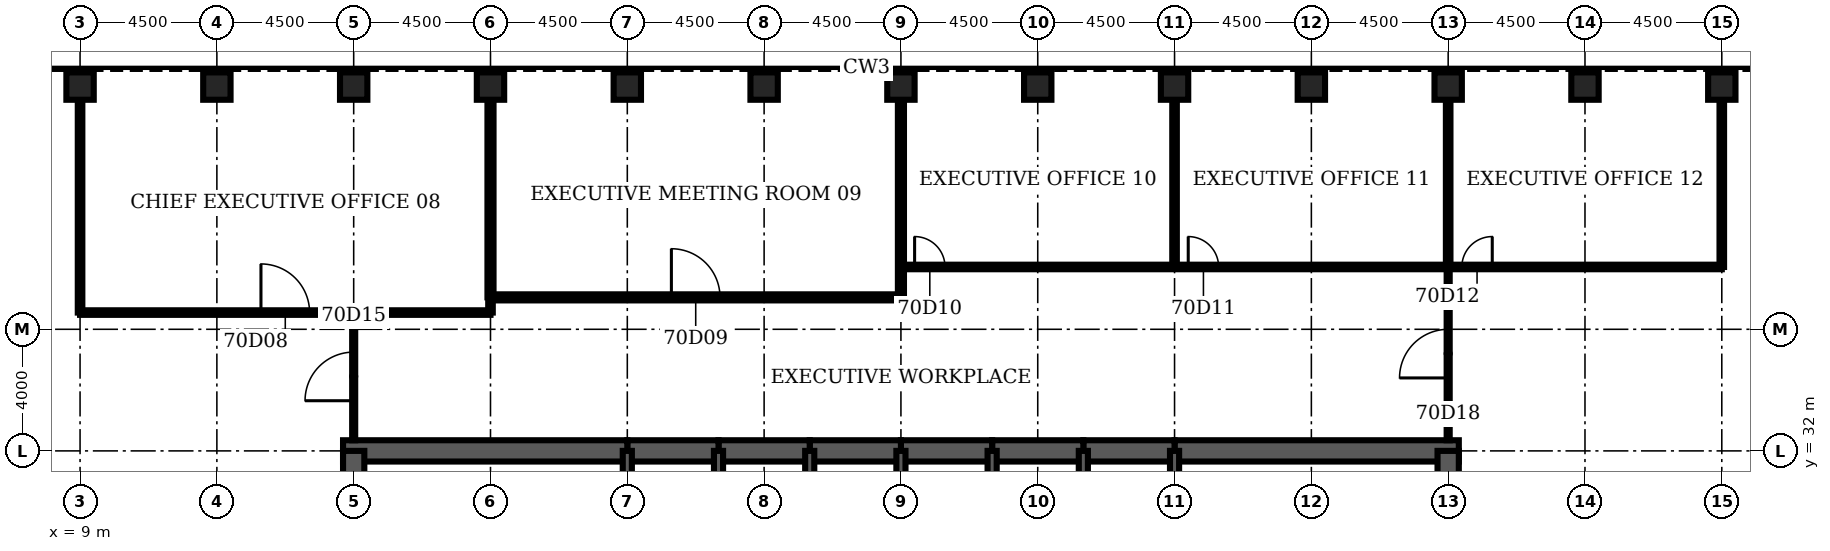
"""IFC4 building model, lengths in metres.
Left out: names, types, materials, properties, quantities, classifications, styles, units other than length and angle.
Written with IfcOpenShell. Run it as: python <this file> out.ifc"""

import sys

from ifc_helpers import new_model, si_unit, direction, frame, frame_2d, origin, origin_2d, place, context, subcontext, project, spatial, rectangle, hollow_rectangle, extrude, element, fill, save


model = new_model("IFC4")
c1 = context("Model", 3, precision=1e-05, world=origin(), true_north=direction((0.0, 1.0)))
c2 = subcontext(c1, "Body", "Model", "MODEL_VIEW")
j1 = project(units=[si_unit("LENGTHUNIT", "METRE"), si_unit("PLANEANGLEUNIT", "RADIAN")], contexts=[c1])
p1 = place(None, origin())
s1 = spatial("IfcSite", under=j1, at=p1, CompositionType="ELEMENT")
p2 = place(p1, origin())
s2 = spatial("IfcBuilding", under=s1, at=p2, CompositionType="ELEMENT")
p3 = place(p2, frame((0.0, 0.0, 308.9)))
s3 = spatial("IfcBuildingStorey", under=s2, at=p3, CompositionType="ELEMENT", Elevation=308.9)
for number, where, z_axis, x_axis in (
    (1, (63.0, 44.0, 0.0), (0.0, 0.0, 1.0), (0.0, 1.0, 0.0)),
    (2, (58.5, 44.0, 0.0), (0.0, 0.0, 1.0), (0.0, 1.0, 0.0)),
    (3, (54.0, 44.0, 0.0), (0.0, 0.0, 1.0), (0.0, 1.0, 0.0)),
    (4, (49.5, 44.0, 0.0), (0.0, 0.0, 1.0), (0.0, 1.0, 0.0)),
    (5, (45.0, 44.0, 0.0), (0.0, 0.0, 1.0), (0.0, 1.0, 0.0)),
    (6, (40.5, 44.0, 0.0), (0.0, 0.0, 1.0), (0.0, 1.0, 0.0)),
    (7, (36.0, 44.0, 0.0), (0.0, 0.0, 1.0), (0.0, 1.0, 0.0)),
    (8, (31.5, 44.0, 0.0), (0.0, 0.0, 1.0), (0.0, 1.0, 0.0)),
    (9, (27.0, 44.0, 0.0), (0.0, 0.0, 1.0), (0.0, 1.0, 0.0)),
    (10, (22.5, 44.0, 0.0), (0.0, 0.0, 1.0), (0.0, 1.0, 0.0)),
    (11, (18.0, 44.0, 0.0), (0.0, 0.0, 1.0), (0.0, 1.0, 0.0)),
    (12, (13.5, 44.0, 0.0), (0.0, 0.0, 1.0), (0.0, 1.0, 0.0)),
    (13, (9.0, 44.0, 0.0), (0.0, 0.0, 1.0), (0.0, 1.0, 0.0)),
):
    element("IfcColumn", number, at=place(p3, frame(where, z_axis=z_axis, x_axis=x_axis)), inside=s3, PredefinedType="COLUMN", context=c2, shape_type="SweptSolid", body=[
        extrude(hollow_rectangle(XDim=0.9, YDim=0.9, WallThickness=0.06, at=origin_2d()), origin(), (0.0, 0.0, 1.0), 4.2),
    ])
p4 = place(p3, frame((54.35, 32.0, 0.0), z_axis=(0.0, 0.0, 1.0), x_axis=(-1.0, 0.0, 0.0)))
e14 = element("IfcWall", 14, at=p4, inside=s3, PredefinedType="SHEAR", context=c2, shape_type="SweptSolid", body=[
    extrude(rectangle(XDim=9.35, YDim=0.7, at=frame_2d((4.675, 0.0))), origin(), (0.0, 0.0, 1.0), 4.2),
])
for number, where, z_axis, x_axis in (
    (15, (45.0, 32.0, 0.0), (0.0, 0.0, 1.0), (-1.0, 0.0, 0.0)),
    (16, (42.0, 32.0, 0.0), (0.0, 0.0, 1.0), (-1.0, 0.0, 0.0)),
    (17, (39.0, 32.0, 0.0), (0.0, 0.0, 1.0), (-1.0, 0.0, 0.0)),
    (18, (36.0, 32.0, 0.0), (0.0, 0.0, 1.0), (-1.0, 0.0, 0.0)),
    (19, (33.0, 32.0, 0.0), (0.0, 0.0, 1.0), (-1.0, 0.0, 0.0)),
    (20, (30.0, 32.0, 0.0), (0.0, 0.0, 1.0), (-1.0, 0.0, 0.0)),
):
    element("IfcWall", number, at=place(p3, frame(where, z_axis=z_axis, x_axis=x_axis)), inside=s3, PredefinedType="SHEAR", context=c2, shape_type="SweptSolid", body=[
        extrude(rectangle(XDim=3.0, YDim=0.7, at=frame_2d((1.5, 0.0))), origin(), (0.0, 0.0, 1.0), 4.2),
    ])
p5 = place(p3, frame((27.0, 32.0, 0.0), z_axis=(0.0, 0.0, 1.0), x_axis=(-1.0, 0.0, 0.0)))
e21 = element("IfcWall", 21, at=p5, inside=s3, PredefinedType="SHEAR", context=c2, shape_type="SweptSolid", body=[
    extrude(rectangle(XDim=9.35, YDim=0.7, at=frame_2d((4.675, 0.0))), origin(), (0.0, 0.0, 1.0), 4.2),
])
for number, where, z_axis, x_axis in (
    (22, (18.0, 32.0, 0.0), (0.0, 0.0, 1.0), (0.0, -1.0, 0.0)),
    (23, (54.0, 28.8, 0.0), (0.0, 0.0, 1.0), (0.0, 1.0, 0.0)),
):
    element("IfcWall", number, at=place(p3, frame(where, z_axis=z_axis, x_axis=x_axis)), inside=s3, PredefinedType="SHEAR", context=c2, shape_type="SweptSolid", body=[
        extrude(rectangle(XDim=3.2, YDim=0.7, at=frame_2d((1.6, 0.0))), origin(), (0.0, 0.0, 1.0), 4.2),
    ])
for number, where, z_axis, x_axis in (
    (24, (27.0, 28.8, 0.0), (0.0, 0.0, 1.0), (0.0, 1.0, 0.0)),
    (25, (30.0, 28.8, 0.0), (0.0, 0.0, 1.0), (0.0, 1.0, 0.0)),
    (26, (33.0, 28.8, 0.0), (0.0, 0.0, 1.0), (0.0, 1.0, 0.0)),
    (27, (36.0, 28.8, 0.0), (0.0, 0.0, 1.0), (0.0, 1.0, 0.0)),
    (28, (39.0, 28.8, 0.0), (0.0, 0.0, 1.0), (0.0, 1.0, 0.0)),
    (29, (42.0, 28.8, 0.0), (0.0, 0.0, 1.0), (0.0, 1.0, 0.0)),
    (30, (45.0, 28.8, 0.0), (0.0, 0.0, 1.0), (0.0, 1.0, 0.0)),
):
    element("IfcWall", number, at=place(p3, frame(where, z_axis=z_axis, x_axis=x_axis)), inside=s3, PredefinedType="SOLIDWALL", context=c2, shape_type="SweptSolid", body=[
        extrude(rectangle(XDim=3.2, YDim=0.3, at=frame_2d((1.6, 0.0))), origin(), (0.0, 0.0, 1.0), 4.2),
    ])
p6 = place(p3, frame((9.0, 36.55, 0.0), z_axis=(0.0, 0.0, 1.0), x_axis=(1.0, 0.0, 0.0)))
e31 = element("IfcWall", 31, at=p6, inside=s3, PredefinedType="PARTITIONING", context=c2, shape_type="SweptSolid", body=[
    extrude(rectangle(XDim=13.5, YDim=0.15, at=frame_2d((6.75, 0.0))), origin(), (0.0, 0.0, 1.0), 3.0),
])
p7 = place(p6, frame((5.95, 0.0, 0.0)))
e32 = element("IfcOpeningElement", 32, at=p7, cuts=e31, PredefinedType="OPENING", context=c2, shape_type="SweptSolid", body=[
    extrude(rectangle(XDim=1.6, YDim=2.1, at=frame_2d((0.8, 1.05))), frame((0.0, 0.085, 0.0), z_axis=(0.0, -1.0, 0.0), x_axis=(1.0, 0.0, 0.0)), (0.0, 0.0, 1.0), 0.17),
])
p8 = place(p3, frame((22.5, 37.05, 0.0), z_axis=(0.0, 0.0, 1.0), x_axis=(1.0, 0.0, 0.0)))
e33 = element("IfcWall", 33, at=p8, inside=s3, PredefinedType="PARTITIONING", context=c2, shape_type="SweptSolid", body=[
    extrude(rectangle(XDim=13.5, YDim=0.2, at=frame_2d((6.75, 0.0))), origin(), (0.0, 0.0, 1.0), 3.0),
])
p9 = place(p8, frame((5.95, 0.0, 0.0)))
e34 = element("IfcOpeningElement", 34, at=p9, cuts=e33, PredefinedType="OPENING", context=c2, shape_type="SweptSolid", body=[
    extrude(rectangle(XDim=1.6, YDim=2.1, at=frame_2d((0.8, 1.05))), frame((0.0, 0.11, 0.0), z_axis=(0.0, -1.0, 0.0), x_axis=(1.0, 0.0, 0.0)), (0.0, 0.0, 1.0), 0.22),
])
p10 = place(p3, frame((36.0, 38.05, 0.0), z_axis=(0.0, 0.0, 1.0), x_axis=(1.0, 0.0, 0.0)))
e35 = element("IfcWall", 35, at=p10, inside=s3, PredefinedType="PARTITIONING", context=c2, shape_type="SweptSolid", body=[
    extrude(rectangle(XDim=27.0, YDim=0.15, at=frame_2d((13.5, 0.0))), origin(), (0.0, 0.0, 1.0), 3.0),
])
p11 = place(p10, frame((0.45, 0.0, 0.0)))
e36 = element("IfcOpeningElement", 36, at=p11, cuts=e35, PredefinedType="OPENING", context=c2, shape_type="SweptSolid", body=[
    extrude(rectangle(XDim=1.0, YDim=2.1, at=frame_2d((0.5, 1.05))), frame((0.0, 0.085, 0.0), z_axis=(0.0, -1.0, 0.0), x_axis=(1.0, 0.0, 0.0)), (0.0, 0.0, 1.0), 0.17),
])
p12 = place(p10, frame((9.45, 0.0, 0.0)))
e37 = element("IfcOpeningElement", 37, at=p12, cuts=e35, PredefinedType="OPENING", context=c2, shape_type="SweptSolid", body=[
    extrude(rectangle(XDim=1.0, YDim=2.1, at=frame_2d((0.5, 1.05))), frame((0.0, 0.085, 0.0), z_axis=(0.0, -1.0, 0.0), x_axis=(1.0, 0.0, 0.0)), (0.0, 0.0, 1.0), 0.17),
])
p13 = place(p10, frame((18.45, 0.0, 0.0)))
e38 = element("IfcOpeningElement", 38, at=p13, cuts=e35, PredefinedType="OPENING", context=c2, shape_type="SweptSolid", body=[
    extrude(rectangle(XDim=1.0, YDim=2.1, at=frame_2d((0.5, 1.05))), frame((0.0, 0.085, 0.0), z_axis=(0.0, -1.0, 0.0), x_axis=(1.0, 0.0, 0.0)), (0.0, 0.0, 1.0), 0.17),
])
p14 = place(p3, frame((9.0, 36.55, 0.0), z_axis=(0.0, 0.0, 1.0), x_axis=(0.0, 1.0, 0.0)))
e39 = element("IfcWall", 39, at=p14, inside=s3, PredefinedType="PARTITIONING", context=c2, shape_type="SweptSolid", body=[
    extrude(rectangle(XDim=7.0, YDim=0.15, at=frame_2d((3.5, 0.0))), origin(), (0.0, 0.0, 1.0), 3.0),
])
p15 = place(p3, frame((18.0, 32.35, 0.0), z_axis=(0.0, 0.0, 1.0), x_axis=(0.0, 1.0, 0.0)))
e40 = element("IfcWall", 40, at=p15, inside=s3, PredefinedType="PARTITIONING", context=c2, shape_type="SweptSolid", body=[
    extrude(rectangle(XDim=4.2, YDim=0.1, at=frame_2d((2.1, 0.0))), origin(), (0.0, 0.0, 1.0), 3.0),
])
p16 = place(p15, frame((1.3, 0.0, 0.0)))
e41 = element("IfcOpeningElement", 41, at=p16, cuts=e40, PredefinedType="OPENING", context=c2, shape_type="SweptSolid", body=[
    extrude(rectangle(XDim=1.6, YDim=2.1, at=frame_2d((0.8, 1.05))), frame((0.0, 0.06, 0.0), z_axis=(0.0, -1.0, 0.0), x_axis=(1.0, 0.0, 0.0)), (0.0, 0.0, 1.0), 0.12),
])
p17 = place(p3, frame((22.5, 36.55, 0.0), z_axis=(0.0, 0.0, 1.0), x_axis=(0.0, 1.0, 0.0)))
e42 = element("IfcWall", 42, at=p17, inside=s3, PredefinedType="PARTITIONING", context=c2, shape_type="SweptSolid", body=[
    extrude(rectangle(XDim=0.5, YDim=0.15, at=frame_2d((0.25, 0.0))), origin(), (0.0, 0.0, 1.0), 3.0),
])
for number, where, z_axis, x_axis in (
    (43, (22.5, 37.05, 0.0), (0.0, 0.0, 1.0), (0.0, 1.0, 0.0)),
    (44, (36.0, 37.05, 0.0), (0.0, 0.0, 1.0), (0.0, 1.0, 0.0)),
):
    element("IfcWall", number, at=place(p3, frame(where, z_axis=z_axis, x_axis=x_axis)), inside=s3, PredefinedType="PARTITIONING", context=c2, shape_type="SweptSolid", body=[
        extrude(rectangle(XDim=6.5, YDim=0.2, at=frame_2d((3.25, 0.0))), origin(), (0.0, 0.0, 1.0), 3.0),
    ])
p18 = place(p3, frame((45.0, 38.05, 0.0), z_axis=(0.0, 0.0, 1.0), x_axis=(0.0, 1.0, 0.0)))
e45 = element("IfcWall", 45, at=p18, inside=s3, PredefinedType="PARTITIONING", context=c2, shape_type="SweptSolid", body=[
    extrude(rectangle(XDim=5.5, YDim=0.15, at=frame_2d((2.75, 0.0))), origin(), (0.0, 0.0, 1.0), 3.0),
])
p19 = place(p3, frame((54.0, 32.35, 0.0), z_axis=(0.0, 0.0, 1.0), x_axis=(0.0, 1.0, 0.0)))
e46 = element("IfcWall", 46, at=p19, inside=s3, PredefinedType="PARTITIONING", context=c2, shape_type="SweptSolid", body=[
    extrude(rectangle(XDim=5.7, YDim=0.1, at=frame_2d((2.85, 0.0))), origin(), (0.0, 0.0, 1.0), 3.0),
])
p20 = place(p19, frame((2.05, 0.0, 0.0)))
e47 = element("IfcOpeningElement", 47, at=p20, cuts=e46, PredefinedType="OPENING", context=c2, shape_type="SweptSolid", body=[
    extrude(rectangle(XDim=1.6, YDim=2.1, at=frame_2d((0.8, 1.05))), frame((0.0, 0.06, 0.0), z_axis=(0.0, -1.0, 0.0), x_axis=(1.0, 0.0, 0.0)), (0.0, 0.0, 1.0), 0.12),
])
for number, where, z_axis, x_axis in (
    (48, (54.0, 38.05, 0.0), (0.0, 0.0, 1.0), (0.0, 1.0, 0.0)),
    (49, (63.0, 38.05, 0.0), (0.0, 0.0, 1.0), (0.0, 1.0, 0.0)),
):
    element("IfcWall", number, at=place(p3, frame(where, z_axis=z_axis, x_axis=x_axis)), inside=s3, PredefinedType="PARTITIONING", context=c2, shape_type="SweptSolid", body=[
        extrude(rectangle(XDim=5.5, YDim=0.15, at=frame_2d((2.75, 0.0))), origin(), (0.0, 0.0, 1.0), 3.0),
    ])
p21 = place(p7, origin())
e50 = element("IfcDoor", 50, at=p21, inside=s3, OperationType="SINGLE_SWING_LEFT", PredefinedType="DOOR", context=c2, shape_type="SweptSolid", body=[
    extrude(rectangle(XDim=1.6, YDim=2.1, at=frame_2d((0.8, 1.05))), frame((0.0, 0.025, 0.0), z_axis=(0.0, -1.0, 0.0), x_axis=(1.0, 0.0, 0.0)), (0.0, 0.0, 1.0), 0.05),
])
fill(e32, e50)
p22 = place(p9, origin())
e51 = element("IfcDoor", 51, at=p22, inside=s3, OperationType="SINGLE_SWING_LEFT", PredefinedType="DOOR", context=c2, shape_type="SweptSolid", body=[
    extrude(rectangle(XDim=1.6, YDim=2.1, at=frame_2d((0.8, 1.05))), frame((0.0, 0.025, 0.0), z_axis=(0.0, -1.0, 0.0), x_axis=(1.0, 0.0, 0.0)), (0.0, 0.0, 1.0), 0.05),
])
fill(e34, e51)
p23 = place(p11, origin())
e52 = element("IfcDoor", 52, at=p23, inside=s3, OperationType="SINGLE_SWING_LEFT", PredefinedType="DOOR", context=c2, shape_type="SweptSolid", body=[
    extrude(rectangle(XDim=1.0, YDim=2.1, at=frame_2d((0.5, 1.05))), frame((0.0, 0.025, 0.0), z_axis=(0.0, -1.0, 0.0), x_axis=(1.0, 0.0, 0.0)), (0.0, 0.0, 1.0), 0.05),
])
fill(e36, e52)
p24 = place(p12, origin())
e53 = element("IfcDoor", 53, at=p24, inside=s3, OperationType="SINGLE_SWING_LEFT", PredefinedType="DOOR", context=c2, shape_type="SweptSolid", body=[
    extrude(rectangle(XDim=1.0, YDim=2.1, at=frame_2d((0.5, 1.05))), frame((0.0, 0.025, 0.0), z_axis=(0.0, -1.0, 0.0), x_axis=(1.0, 0.0, 0.0)), (0.0, 0.0, 1.0), 0.05),
])
fill(e37, e53)
p25 = place(p13, origin())
e54 = element("IfcDoor", 54, at=p25, inside=s3, OperationType="SINGLE_SWING_RIGHT", PredefinedType="DOOR", context=c2, shape_type="SweptSolid", body=[
    extrude(rectangle(XDim=1.0, YDim=2.1, at=frame_2d((0.5, 1.05))), frame((0.0, 0.025, 0.0), z_axis=(0.0, -1.0, 0.0), x_axis=(1.0, 0.0, 0.0)), (0.0, 0.0, 1.0), 0.05),
])
fill(e38, e54)
p26 = place(p16, origin())
e55 = element("IfcDoor", 55, at=p26, inside=s3, OperationType="SINGLE_SWING_LEFT", PredefinedType="DOOR", context=c2, shape_type="SweptSolid", body=[
    extrude(rectangle(XDim=1.6, YDim=2.1, at=frame_2d((0.8, 1.05))), frame((0.0, 0.025, 0.0), z_axis=(0.0, -1.0, 0.0), x_axis=(1.0, 0.0, 0.0)), (0.0, 0.0, 1.0), 0.05),
])
fill(e41, e55)
p27 = place(p20, origin())
e56 = element("IfcDoor", 56, at=p27, inside=s3, OperationType="SINGLE_SWING_LEFT", PredefinedType="DOOR", context=c2, shape_type="SweptSolid", body=[
    extrude(rectangle(XDim=1.6, YDim=2.1, at=frame_2d((0.8, 1.05))), frame((0.0, 0.025, 0.0), z_axis=(0.0, -1.0, 0.0), x_axis=(1.0, 0.0, 0.0)), (0.0, 0.0, 1.0), 0.05),
])
fill(e47, e56)
save(model, sys.argv[1])
